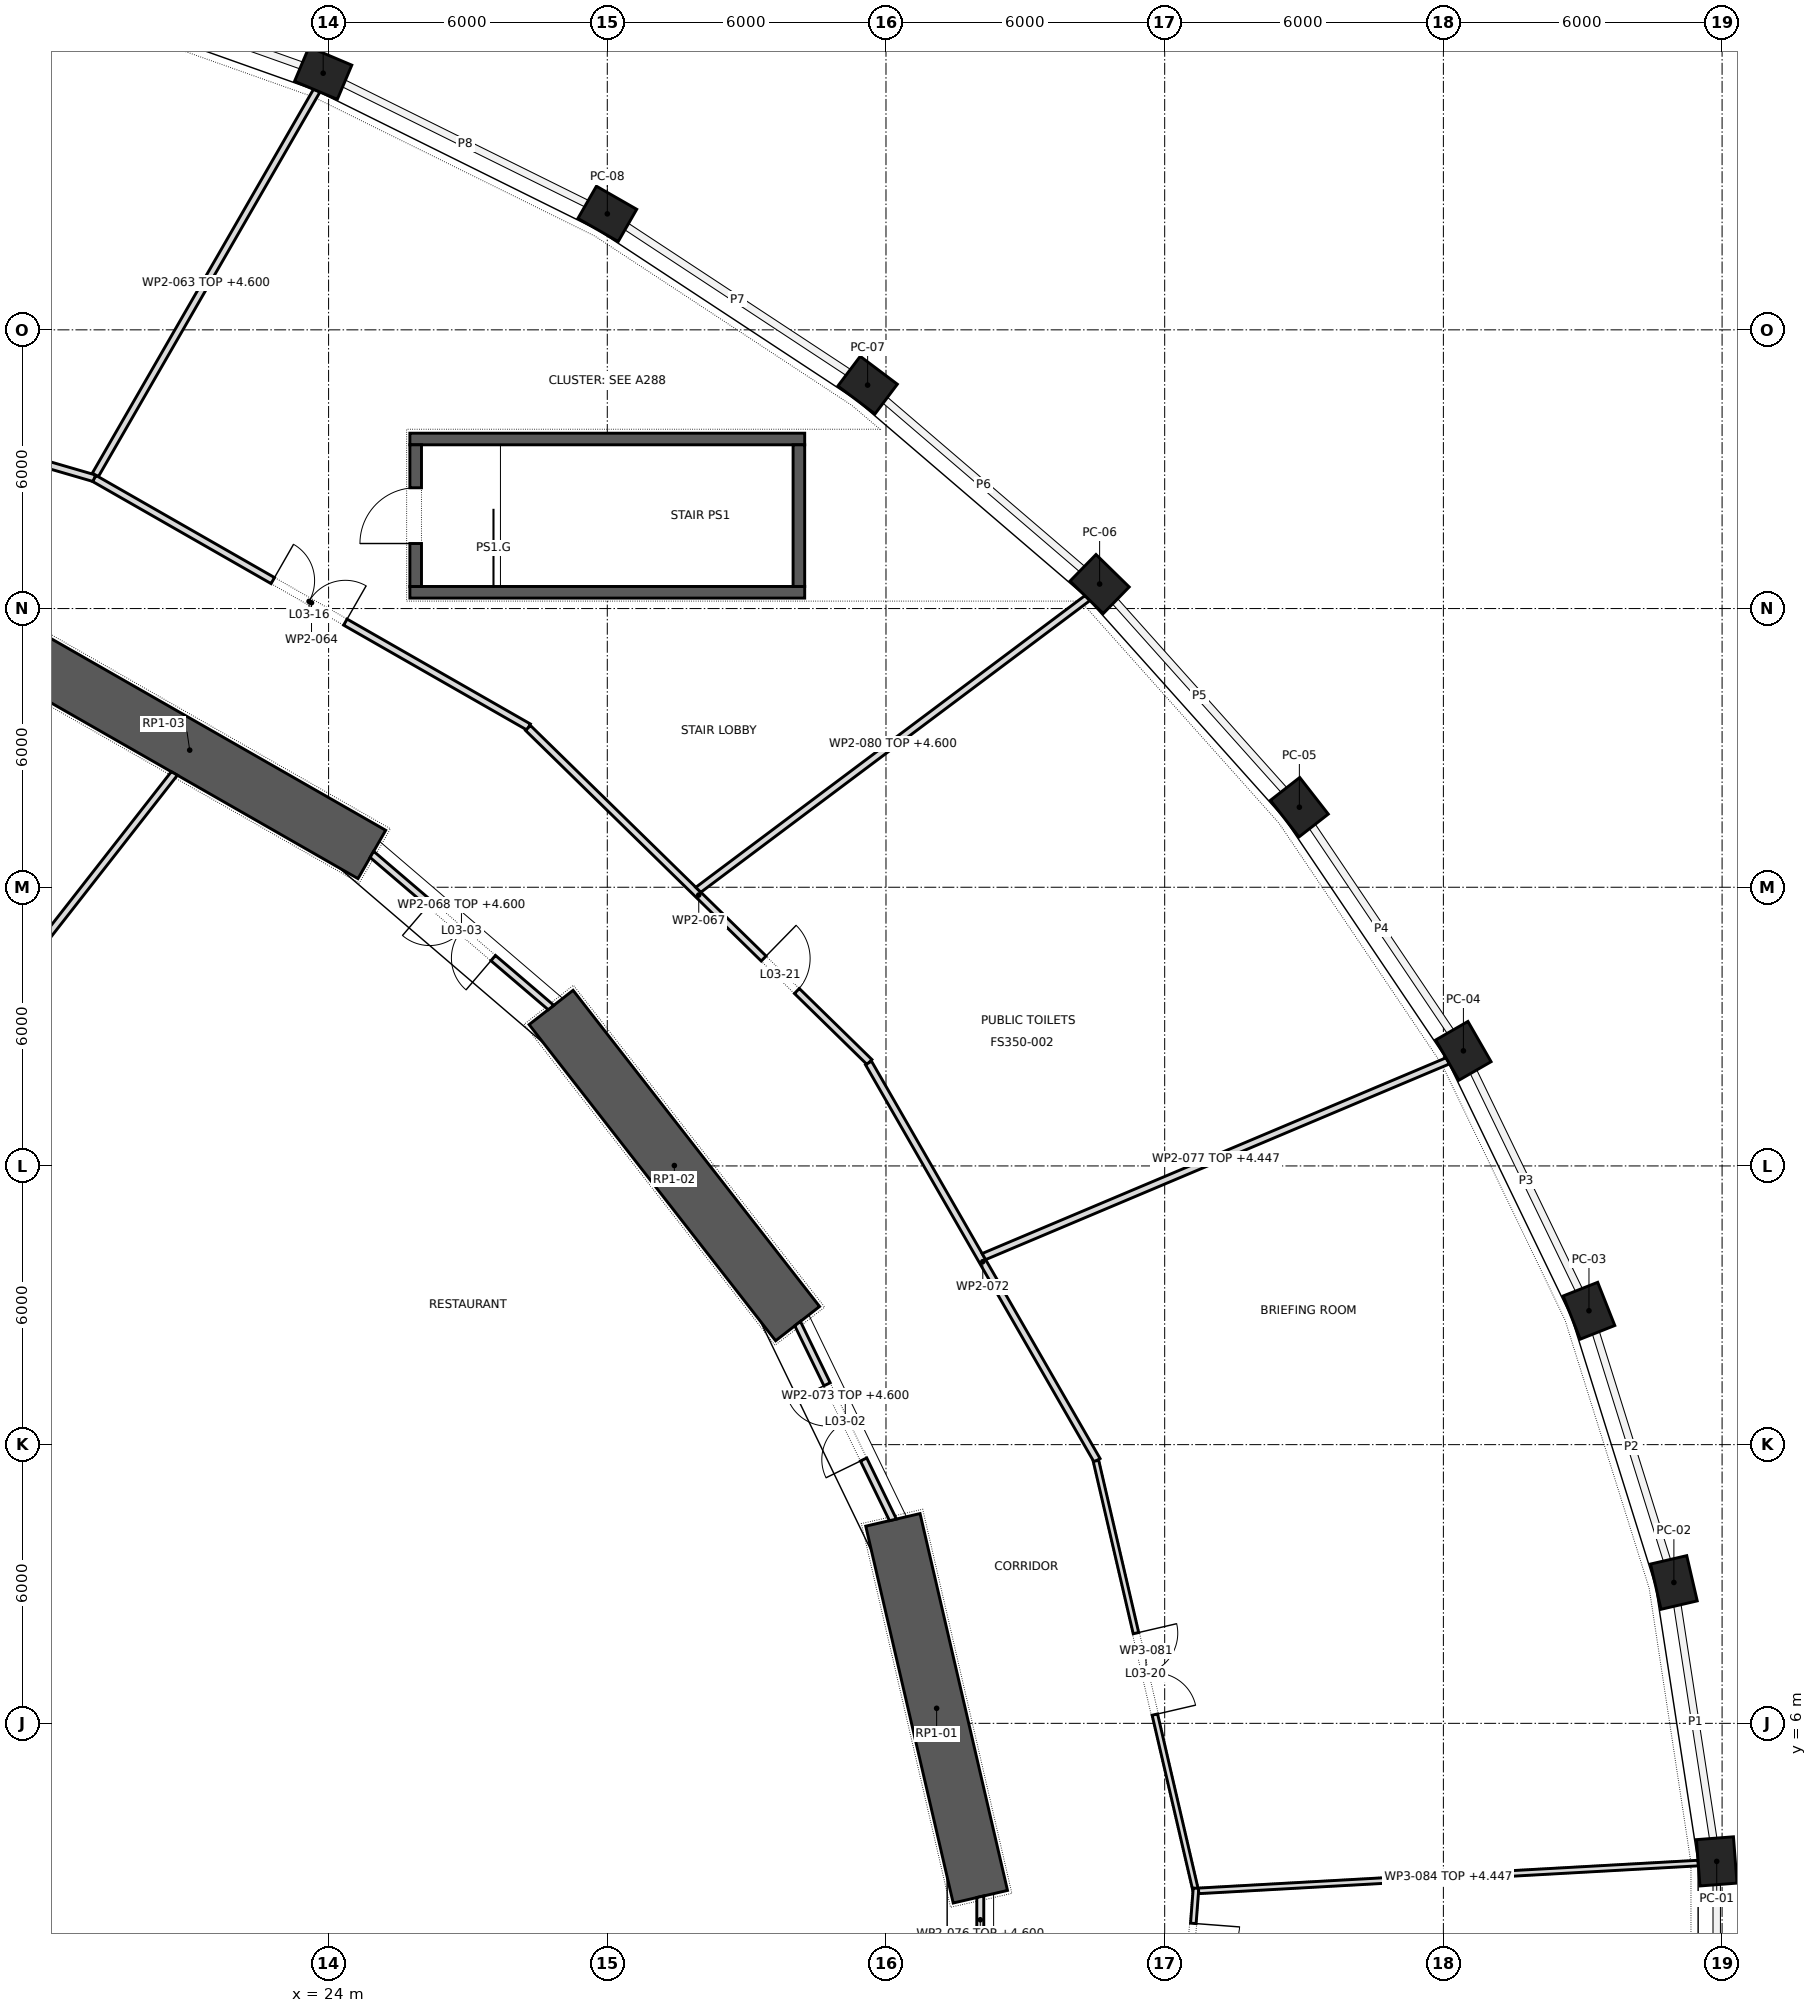
"""IFC4 building model, lengths in metres.
Left out: names, types, materials, properties, quantities, classifications, styles, units other than length and angle.
Written with IfcOpenShell. Run it as: python <this file> out.ifc"""

import sys

from ifc_helpers import new_model, si_unit, direction, frame, frame_2d, origin, origin_2d, place, context, subcontext, project, spatial, polyline, rectangle, outline, extrude, element, fill, save


model = new_model("IFC4")
c1 = context("Model", 3, precision=1e-05, world=origin(), true_north=direction((0.0, 1.0)))
c2 = subcontext(c1, "Body", "Model", "MODEL_VIEW")
j1 = project(units=[si_unit("LENGTHUNIT", "METRE"), si_unit("PLANEANGLEUNIT", "RADIAN")], contexts=[c1])
p1 = place(None, origin())
s1 = spatial("IfcSite", under=j1, at=p1, CompositionType="ELEMENT")
p2 = place(p1, origin())
s2 = spatial("IfcBuilding", under=s1, at=p2, CompositionType="ELEMENT")
p3 = place(p2, frame((0.0, 0.0, 18.0)))
s3 = spatial("IfcBuildingStorey", under=s2, at=p3, CompositionType="ELEMENT", Elevation=18.0)
for number, where, z_axis, x_axis in (
    (1, (53.885, 3.028, 0.0), (0.0, 0.0, 1.0), (-0.076, 0.997, 0.0)),
    (2, (52.962, 9.033, 0.0), (0.0, 0.0, 1.0), (-0.226, 0.974, 0.0)),
    (3, (51.134, 14.883, 0.0), (0.0, 0.0, 1.0), (-0.368, 0.93, 0.0)),
    (4, (48.431, 20.478, 0.0), (0.0, 0.0, 1.0), (-0.499, 0.867, 0.0)),
    (5, (44.899, 25.723, 0.0), (0.0, 0.0, 1.0), (-0.615, 0.789, 0.0)),
    (6, (40.599, 30.528, 0.0), (0.0, 0.0, 1.0), (-0.715, 0.699, 0.0)),
    (7, (35.605, 34.81, 0.0), (0.0, 0.0, 1.0), (-0.799, 0.601, 0.0)),
    (8, (30.001, 38.497, 0.0), (0.0, 0.0, 1.0), (-0.868, 0.497, 0.0)),
    (9, (23.884, 41.525, 0.0), (0.0, 0.0, 1.0), (-0.921, 0.389, 0.0)),
):
    element("IfcColumn", number, at=place(p3, frame(where, z_axis=z_axis, x_axis=x_axis)), inside=s3, PredefinedType="COLUMN", context=c2, shape_type="SweptSolid", body=[
        extrude(rectangle(XDim=1.0, YDim=0.8, at=origin_2d()), origin(), (0.0, 0.0, 1.0), 5.5),
    ])
p4 = place(p3, frame((38.032, 2.267, 0.0), z_axis=(0.0, 0.0, 1.0), x_axis=(-0.226058185805, 0.974113800657, 0.0)))
e10 = element("IfcWall", 10, at=p4, inside=s3, PredefinedType="SHEAR", context=c2, shape_type="SweptSolid", body=[
    extrude(rectangle(XDim=8.329, YDim=1.2, at=frame_2d((4.165, 0.0))), origin(), (0.0, 0.0, 1.0), 5.5),
])
p5 = place(p3, frame((34.097, 14.605, 0.0), z_axis=(0.0, 0.0, 1.0), x_axis=(-0.614825322247, 0.788663314174, 0.0)))
e11 = element("IfcWall", 11, at=p5, inside=s3, PredefinedType="SHEAR", context=c2, shape_type="SweptSolid", body=[
    extrude(rectangle(XDim=8.632, YDim=1.2, at=frame_2d((4.316, 0.0))), origin(), (0.0, 0.0, 1.0), 5.5),
])
p6 = place(p3, frame((24.931, 24.706, 0.0), z_axis=(0.0, 0.0, 1.0), x_axis=(-0.867760656864, 0.496982336103, 0.0)))
e12 = element("IfcWall", 12, at=p6, inside=s3, PredefinedType="SHEAR", context=c2, shape_type="SweptSolid", body=[
    extrude(rectangle(XDim=9.038, YDim=1.2, at=frame_2d((4.519, 0.0))), origin(), (0.0, 0.0, 1.0), 5.5),
])
for number, where, z_axis, x_axis in (
    (13, (25.75, 33.65, 0.0), (0.0, 0.0, 1.0), (1.0, 0.0, 0.0)),
    (14, (25.75, 30.35, 0.0), (0.0, 0.0, 1.0), (1.0, 0.0, 0.0)),
):
    element("IfcWall", number, at=place(p3, frame(where, z_axis=z_axis, x_axis=x_axis)), inside=s3, PredefinedType="SHEAR", context=c2, shape_type="SweptSolid", body=[
        extrude(rectangle(XDim=8.5, YDim=0.25, at=frame_2d((4.25, 0.0))), origin(), (0.0, 0.0, 1.0), 5.2),
    ])
p7 = place(p3, frame((25.875, 30.475, 0.0), z_axis=(0.0, 0.0, 1.0), x_axis=(0.0, 1.0, 0.0)))
e15 = element("IfcWall", 15, at=p7, inside=s3, PredefinedType="SHEAR", context=c2, shape_type="SweptSolid", body=[
    extrude(rectangle(XDim=3.05, YDim=0.25, at=frame_2d((1.525, 0.0))), origin(), (0.0, 0.0, 1.0), 5.2),
])
p8 = place(p7, frame((0.925, 0.0, 0.0)))
e16 = element("IfcOpeningElement", 16, at=p8, cuts=e15, PredefinedType="OPENING", context=c2, shape_type="SweptSolid", body=[
    extrude(rectangle(XDim=1.2, YDim=2.1, at=frame_2d((0.6, 1.05))), frame((0.0, 0.137, 0.0), z_axis=(0.0, -1.0, 0.0), x_axis=(1.0, 0.0, 0.0)), (0.0, 0.0, 1.0), 0.274),
])
p9 = place(p3, frame((34.125, 30.475, 0.0), z_axis=(0.0, 0.0, 1.0), x_axis=(0.0, 1.0, 0.0)))
e17 = element("IfcWall", 17, at=p9, inside=s3, PredefinedType="SHEAR", context=c2, shape_type="SweptSolid", body=[
    extrude(rectangle(XDim=3.05, YDim=0.25, at=frame_2d((1.525, 0.0))), origin(), (0.0, 0.0, 1.0), 5.2),
])
p10 = place(p3, frame((8.446, 35.862, 0.0), z_axis=(0.0, 0.0, 1.0), x_axis=(0.96020899529, -0.27928244729, 0.0)))
e18 = element("IfcWall", 18, at=p10, inside=s3, PredefinedType="PARTITIONING", context=c2, shape_type="SweptSolid", body=[
    extrude(rectangle(XDim=10.95, YDim=0.15, at=frame_2d((5.475, 0.0))), origin(), (0.0, 0.0, 1.0), 5.2),
])
p11 = place(p3, frame((11.788, 15.074, 0.0), z_axis=(0.0, 0.0, 1.0), x_axis=(0.615848120598, 0.787864894735, 0.0)))
e19 = element("IfcWall", 19, at=p11, inside=s3, PredefinedType="PARTITIONING", context=c2, shape_type="SweptSolid", body=[
    extrude(outline(polyline([(0.0, -0.075), (14.449, -0.075), (14.428, 0.075), (0.0, 0.075), (0.0, -0.075)])), origin(), (0.0, 0.0, 1.0), 5.2),
])
p12 = place(p3, frame((18.978, 32.876, 0.0), z_axis=(0.0, 0.0, 1.0), x_axis=(0.499214042651, 0.866478701192, 0.0)))
e20 = element("IfcWall", 20, at=p12, inside=s3, PredefinedType="PARTITIONING", context=c2, shape_type="SweptSolid", body=[
    extrude(outline(polyline([(0.0, -0.075), (9.558, -0.075), (9.54, 0.075), (0.0, 0.075), (0.0, -0.075)])), origin(), (0.0, 0.0, 1.0), 4.6),
])
p13 = place(p3, frame((18.958, 32.8, 0.0), z_axis=(0.0, 0.0, 1.0), x_axis=(0.867958465669, -0.496636790697, 0.0)))
e21 = element("IfcWall", 21, at=p13, inside=s3, PredefinedType="PARTITIONING", context=c2, shape_type="SweptSolid", body=[
    extrude(rectangle(XDim=10.772, YDim=0.15, at=frame_2d((5.386, 0.0))), origin(), (0.0, 0.0, 1.0), 5.2),
])
p14 = place(p13, frame((4.425, 0.0, 0.0)))
e22 = element("IfcOpeningElement", 22, at=p14, cuts=e21, PredefinedType="OPENING", context=c2, shape_type="SweptSolid", body=[
    extrude(rectangle(XDim=1.8, YDim=2.1, at=frame_2d((0.9, 1.05))), frame((0.0, 0.087, 0.0), z_axis=(0.0, -1.0, 0.0), x_axis=(1.0, 0.0, 0.0)), (0.0, 0.0, 1.0), 0.174),
])
p15 = place(p3, frame((28.294, 27.428, 0.0), z_axis=(0.0, 0.0, 1.0), x_axis=(0.71483918539, -0.699288880958, 0.0)))
e23 = element("IfcWall", 23, at=p15, inside=s3, PredefinedType="PARTITIONING", context=c2, shape_type="SweptSolid", body=[
    extrude(rectangle(XDim=10.283, YDim=0.15, at=frame_2d((5.142, 0.0))), origin(), (0.0, 0.0, 1.0), 5.2),
])
p16 = place(p15, frame((7.097, 0.0, 0.0)))
e24 = element("IfcOpeningElement", 24, at=p16, cuts=e23, PredefinedType="OPENING", context=c2, shape_type="SweptSolid", body=[
    extrude(rectangle(XDim=1.0, YDim=2.1, at=frame_2d((0.5, 1.05))), frame((0.0, 0.087, 0.0), z_axis=(0.0, -1.0, 0.0), x_axis=(1.0, 0.0, 0.0)), (0.0, 0.0, 1.0), 0.174),
])
p17 = place(p3, frame((28.789, 21.411, 0.0), z_axis=(0.0, 0.0, 1.0), x_axis=(-0.760084552743, 0.649824185978, 0.0)))
e25 = element("IfcWall", 25, at=p17, inside=s3, PredefinedType="PARTITIONING", context=c2, shape_type="SweptSolid", body=[
    extrude(outline(polyline([(-0.015, -0.075), (5.089, -0.075), (5.061, 0.075), (0.015, 0.075), (-0.015, -0.075)])), origin(), (0.0, 0.0, 1.0), 4.6),
])
p18 = place(p17, frame((1.638, 0.0, 0.0)))
e26 = element("IfcOpeningElement", 26, at=p18, cuts=e25, PredefinedType="OPENING", context=c2, shape_type="SweptSolid", body=[
    extrude(rectangle(XDim=1.8, YDim=2.1, at=frame_2d((0.9, 1.05))), frame((0.0, 0.087, 0.0), z_axis=(0.0, -1.0, 0.0), x_axis=(1.0, 0.0, 0.0)), (0.0, 0.0, 1.0), 0.174),
])
p19 = place(p3, frame((35.624, 20.216, 0.0), z_axis=(0.0, 0.0, 1.0), x_axis=(0.49865472402, -0.866800707321, 0.0)))
e27 = element("IfcWall", 27, at=p19, inside=s3, PredefinedType="PARTITIONING", context=c2, shape_type="SweptSolid", body=[
    extrude(rectangle(XDim=9.868, YDim=0.15, at=frame_2d((4.934, 0.0))), origin(), (0.0, 0.0, 1.0), 5.2),
])
p20 = place(p3, frame((36.15, 10.38, 0.0), z_axis=(0.0, 0.0, 1.0), x_axis=(-0.436936398764, 0.899492403212, 0.0)))
e28 = element("IfcWall", 28, at=p20, inside=s3, PredefinedType="PARTITIONING", context=c2, shape_type="SweptSolid", body=[
    extrude(outline(polyline([(-0.017, -0.075), (4.714, -0.075), (4.682, 0.075), (0.017, 0.075), (-0.017, -0.075)])), origin(), (0.0, 0.0, 1.0), 4.6),
])
p21 = place(p20, frame((1.446, 0.0, 0.0)))
e29 = element("IfcOpeningElement", 29, at=p21, cuts=e28, PredefinedType="OPENING", context=c2, shape_type="SweptSolid", body=[
    extrude(rectangle(XDim=1.8, YDim=2.1, at=frame_2d((0.9, 1.05))), frame((0.0, 0.087, 0.0), z_axis=(0.0, -1.0, 0.0), x_axis=(1.0, 0.0, 0.0)), (0.0, 0.0, 1.0), 0.174),
])
p22 = place(p3, frame((38.03, 1.275, 0.0), z_axis=(0.0, 0.0, 1.0), x_axis=(0.0, 1.0, 0.0)))
e30 = element("IfcWall", 30, at=p22, inside=s3, PredefinedType="PARTITIONING", context=c2, shape_type="SweptSolid", body=[
    extrude(outline(polyline([(0.0, -0.075), (1.01, -0.075), (0.975, 0.075), (0.0, 0.075), (0.0, -0.075)])), origin(), (0.0, 0.0, 1.0), 4.6),
])
p23 = place(p3, frame((38.107, 16.048, 0.0), z_axis=(0.0, 0.0, 1.0), x_axis=(0.92132899404, 0.3887838535, 0.0)))
e31 = element("IfcWall", 31, at=p23, inside=s3, PredefinedType="PARTITIONING", context=c2, shape_type="SweptSolid", body=[
    extrude(outline(polyline([(0.009, -0.075), (10.849, -0.075), (10.831, 0.075), (-0.009, 0.075), (0.009, -0.075)])), origin(), (0.0, 0.0, 1.0), 4.447),
])
p24 = place(p3, frame((40.337, 30.226, 0.0), z_axis=(0.0, 0.0, 1.0), x_axis=(-0.800117504973, -0.599843294732, 0.0)))
e32 = element("IfcWall", 32, at=p24, inside=s3, PredefinedType="PARTITIONING", context=c2, shape_type="SweptSolid", body=[
    extrude(outline(polyline([(0.011, -0.075), (10.482, -0.075), (10.459, 0.075), (-0.011, 0.075), (0.011, -0.075)])), origin(), (0.0, 0.0, 1.0), 4.6),
])
p25 = place(p3, frame((40.521, 11.65, 0.0), z_axis=(0.0, 0.0, 1.0), x_axis=(0.226075864332, -0.974109697912, 0.0)))
e33 = element("IfcWall", 33, at=p25, inside=s3, PredefinedType="PARTITIONING", context=c2, shape_type="SweptSolid", body=[
    extrude(rectangle(XDim=9.527, YDim=0.12, at=frame_2d((4.763, 0.0))), origin(), (0.0, 0.0, 1.0), 5.2),
])
p26 = place(p25, frame((3.807, 0.0, 0.0)))
e34 = element("IfcOpeningElement", 34, at=p26, cuts=e33, PredefinedType="OPENING", context=c2, shape_type="SweptSolid", body=[
    extrude(rectangle(XDim=1.8, YDim=2.1, at=frame_2d((0.9, 1.05))), frame((0.0, 0.072, 0.0), z_axis=(0.0, -1.0, 0.0), x_axis=(1.0, 0.0, 0.0)), (0.0, 0.0, 1.0), 0.144),
])
p27 = place(p3, frame((41.947, -7.04, 0.0), z_axis=(0.0, 0.0, 1.0), x_axis=(0.076437580216, 0.997074368506, 0.0)))
e35 = element("IfcWall", 35, at=p27, inside=s3, PredefinedType="PARTITIONING", context=c2, shape_type="SweptSolid", body=[
    extrude(rectangle(XDim=9.518, YDim=0.12, at=frame_2d((4.759, 0.0))), origin(), (0.0, 0.0, 1.0), 5.2),
])
p28 = place(p27, frame((7.759, 0.0, 0.0)))
e36 = element("IfcOpeningElement", 36, at=p28, cuts=e35, PredefinedType="OPENING", context=c2, shape_type="SweptSolid", body=[
    extrude(rectangle(XDim=1.0, YDim=2.1, at=frame_2d((0.5, 1.05))), frame((0.0, 0.072, 0.0), z_axis=(0.0, -1.0, 0.0), x_axis=(1.0, 0.0, 0.0)), (0.0, 0.0, 1.0), 0.144),
])
p29 = place(p3, frame((53.487, 2.992, 0.0), z_axis=(0.0, 0.0, 1.0), x_axis=(-0.998454909458, -0.055567920423, 0.0)))
e37 = element("IfcWall", 37, at=p29, inside=s3, PredefinedType="PARTITIONING", context=c2, shape_type="SweptSolid", body=[
    extrude(outline(polyline([(0.001, -0.06), (10.773, -0.06), (10.773, 0.06), (-0.001, 0.06), (0.001, -0.06)])), origin(), (0.0, 0.0, 1.0), 4.447),
])
p30 = place(p8, origin())
e38 = element("IfcDoor", 38, at=p30, inside=s3, OperationType="SINGLE_SWING_RIGHT", PredefinedType="DOOR", context=c2, shape_type="SweptSolid", body=[
    extrude(rectangle(XDim=1.2, YDim=2.1, at=frame_2d((0.6, 1.05))), frame((0.0, 0.025, 0.0), z_axis=(0.0, -1.0, 0.0), x_axis=(1.0, 0.0, 0.0)), (0.0, 0.0, 1.0), 0.05),
])
fill(e16, e38)
p31 = place(p21, origin())
e39 = element("IfcDoor", 39, at=p31, inside=s3, OperationType="DOUBLE_DOOR_SINGLE_SWING", PredefinedType="DOOR", context=c2, shape_type="SweptSolid", body=[
    extrude(rectangle(XDim=1.8, YDim=2.1, at=frame_2d((0.9, 1.05))), frame((0.0, 0.025, 0.0), z_axis=(0.0, -1.0, 0.0), x_axis=(1.0, 0.0, 0.0)), (0.0, 0.0, 1.0), 0.05),
])
fill(e29, e39)
p32 = place(p18, origin())
e40 = element("IfcDoor", 40, at=p32, inside=s3, OperationType="DOUBLE_DOOR_SINGLE_SWING", PredefinedType="DOOR", context=c2, shape_type="SweptSolid", body=[
    extrude(rectangle(XDim=1.8, YDim=2.1, at=frame_2d((0.9, 1.05))), frame((0.0, 0.025, 0.0), z_axis=(0.0, -1.0, 0.0), x_axis=(1.0, 0.0, 0.0)), (0.0, 0.0, 1.0), 0.05),
])
fill(e26, e40)
p33 = place(p14, origin())
e41 = element("IfcDoor", 41, at=p33, inside=s3, OperationType="DOUBLE_DOOR_SINGLE_SWING", PredefinedType="DOOR", context=c2, shape_type="SweptSolid", body=[
    extrude(rectangle(XDim=1.8, YDim=2.1, at=frame_2d((0.9, 1.05))), frame((0.0, 0.025, 0.0), z_axis=(0.0, -1.0, 0.0), x_axis=(1.0, 0.0, 0.0)), (0.0, 0.0, 1.0), 0.05),
])
fill(e22, e41)
p34 = place(p26, origin())
e42 = element("IfcDoor", 42, at=p34, inside=s3, OperationType="DOUBLE_DOOR_SINGLE_SWING", PredefinedType="DOOR", context=c2, shape_type="SweptSolid", body=[
    extrude(rectangle(XDim=1.8, YDim=2.1, at=frame_2d((0.9, 1.05))), frame((0.0, 0.025, 0.0), z_axis=(0.0, -1.0, 0.0), x_axis=(1.0, 0.0, 0.0)), (0.0, 0.0, 1.0), 0.05),
])
fill(e34, e42)
p35 = place(p16, origin())
e43 = element("IfcDoor", 43, at=p35, inside=s3, OperationType="SINGLE_SWING_RIGHT", PredefinedType="DOOR", context=c2, shape_type="SweptSolid", body=[
    extrude(rectangle(XDim=1.0, YDim=2.1, at=frame_2d((0.5, 1.05))), frame((0.0, 0.025, 0.0), z_axis=(0.0, -1.0, 0.0), x_axis=(1.0, 0.0, 0.0)), (0.0, 0.0, 1.0), 0.05),
])
fill(e24, e43)
p36 = place(p28, frame((1.0, 0.0, 0.0), z_axis=(0.0, 0.0, 1.0), x_axis=(-1.0, 0.0, 0.0)))
e44 = element("IfcDoor", 44, at=p36, inside=s3, OperationType="SINGLE_SWING_RIGHT", PredefinedType="DOOR", context=c2, shape_type="SweptSolid", body=[
    extrude(rectangle(XDim=1.0, YDim=2.1, at=frame_2d((0.5, 1.05))), frame((0.0, 0.025, 0.0), z_axis=(0.0, -1.0, 0.0), x_axis=(1.0, 0.0, 0.0)), (0.0, 0.0, 1.0), 0.05),
])
fill(e36, e44)
save(model, sys.argv[1])
